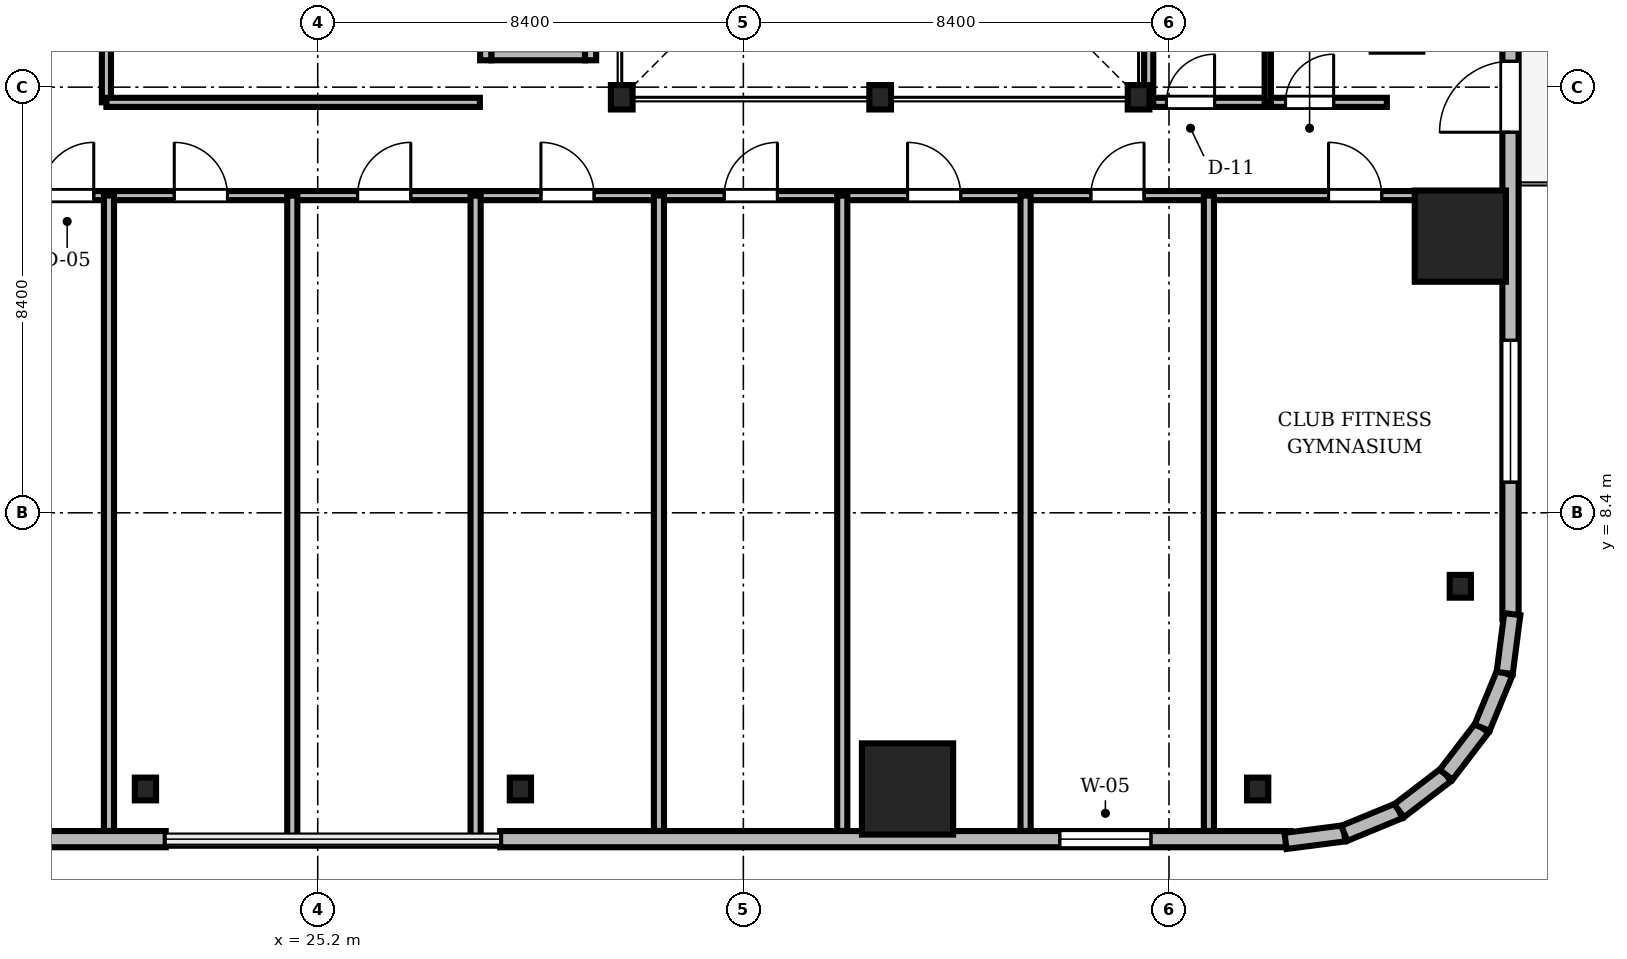
"""IFC4 building model, lengths in metres.
Left out: names, types, materials, properties, quantities, classifications, styles, units other than length and angle.
Written with IfcOpenShell. Run it as: python <this file> out.ifc"""

import sys

from ifc_helpers import new_model, si_unit, direction, frame, frame_2d, origin, origin_2d, place, context, subcontext, project, spatial, rectangle, i_section, extrude, source, transform, mapped, element, fill, save


model = new_model("IFC4")
c1 = context("Model", 3, precision=1e-05, world=origin(), true_north=direction((0.0, 1.0)))
c2 = subcontext(c1, "Body", "Model", "MODEL_VIEW")
j1 = project(units=[si_unit("LENGTHUNIT", "METRE"), si_unit("PLANEANGLEUNIT", "RADIAN")], contexts=[c1])
p1 = place(None, origin())
s1 = spatial("IfcSite", under=j1, at=p1, CompositionType="ELEMENT")
p2 = place(p1, origin())
s2 = spatial("IfcBuilding", under=s1, at=p2, CompositionType="ELEMENT")
p3 = place(p2, frame((0.0, 0.0, 64.1)))
s3 = spatial("IfcBuildingStorey", under=s2, at=p3, CompositionType="ELEMENT", Elevation=64.1)
m1 = source(origin(), c2, "Body", "SweptSolid", [
    extrude(i_section(OverallWidth=0.428, OverallDepth=0.481, WebThickness=0.04, FlangeThickness=0.063, FilletRadius=0.015, at=origin_2d()), origin(), (0.0, 0.0, 1.0), 3.41),
])
for number, where, z_axis, x_axis in (
    (1, (31.2, 16.6, 0.0), (0.0, 0.0, 1.0), (1.0, 0.0, 0.0)),
    (2, (36.3, 16.6, 0.0), (0.0, 0.0, 1.0), (1.0, 0.0, 0.0)),
    (3, (41.4, 16.6, 0.0), (0.0, 0.0, 1.0), (1.0, 0.0, 0.0)),
):
    element("IfcColumn", number, at=place(p3, frame(where, z_axis=z_axis, x_axis=x_axis)), inside=s3, PredefinedType="COLUMN", context=c2, shape_type="MappedRepresentation", body=[
        mapped(m1, transform((0.0, 0.0, 0.0), scale=1.0)),
    ])
m2 = source(origin(), c2, "Body", "SweptSolid", [
    extrude(rectangle(XDim=1.8, YDim=1.8, at=origin_2d()), origin(), (0.0, 0.0, 1.0), 3.41),
])
for number, where, z_axis, x_axis in (
    (4, (36.84, 2.95, 0.0), (0.0, 0.0, 1.0), (1.0, 0.0, 0.0)),
    (5, (47.75, 13.86, 0.0), (0.0, 0.0, 1.0), (1.0, 0.0, 0.0)),
):
    element("IfcColumn", number, at=place(p3, frame(where, z_axis=z_axis, x_axis=x_axis)), inside=s3, PredefinedType="COLUMN", context=c2, shape_type="MappedRepresentation", body=[
        mapped(m2, transform((0.0, 0.0, 0.0), scale=1.0)),
    ])
m3 = source(origin(), c2, "Body", "SweptSolid", [
    extrude(i_section(OverallWidth=0.419, OverallDepth=0.449, WebThickness=0.031, FlangeThickness=0.048, FilletRadius=0.015, at=origin_2d()), origin(), (0.0, 0.0, 1.0), 3.41),
])
for number, where, z_axis, x_axis in (
    (6, (21.8, 2.95, 0.0), (0.0, 0.0, 1.0), (1.0, 0.0, 0.0)),
    (7, (29.2, 2.95, 0.0), (0.0, 0.0, 1.0), (1.0, 0.0, 0.0)),
    (8, (43.75, 2.95, 0.0), (0.0, 0.0, 1.0), (1.0, 0.0, 0.0)),
    (9, (47.75, 6.95, 0.0), (0.0, 0.0, 1.0), (1.0, 0.0, 0.0)),
):
    element("IfcColumn", number, at=place(p3, frame(where, z_axis=z_axis, x_axis=x_axis)), inside=s3, PredefinedType="COLUMN", context=c2, shape_type="MappedRepresentation", body=[
        mapped(m3, transform((0.0, 0.0, 0.0), scale=1.0)),
    ])
m4 = source(origin(), c2, "Body", "SweptSolid", [
    extrude(rectangle(XDim=15.6, YDim=0.32, at=frame_2d((7.8, 0.0))), origin(), (0.0, 0.0, 1.0), 3.41),
])
p4 = place(p3, frame((6.6, 1.96, 0.0), z_axis=(0.0, 0.0, 1.0), x_axis=(1.0, 0.0, 0.0)))
e10 = element("IfcWall", 10, at=p4, inside=s3, PredefinedType="SOLIDWALL", context=c2, shape_type="MappedRepresentation", body=[
    mapped(m4, transform((0.0, 0.0, 0.0), scale=1.0)),
])
m5 = source(origin(), c2, "Body", "SweptSolid", [
    extrude(rectangle(XDim=1.4, YDim=2.3, at=frame_2d((0.7, 1.15))), frame((0.0, 0.17, 0.0), z_axis=(0.0, -1.0, 0.0), x_axis=(1.0, 0.0, 0.0)), (0.0, 0.0, 1.0), 0.34),
])
p5 = place(p4, frame((9.61, 0.0, 0.0)))
e11 = element("IfcOpeningElement", 11, at=p5, cuts=e10, PredefinedType="OPENING", context=c2, shape_type="MappedRepresentation", body=[
    mapped(m5, transform((0.0, 0.0, 0.0), scale=1.0)),
])
m6 = source(origin(), c2, "Body", "SweptSolid", [
    extrude(rectangle(XDim=2.8, YDim=2.4, at=frame_2d((1.4, 1.2))), frame((0.0, 0.17, 0.0), z_axis=(0.0, -1.0, 0.0), x_axis=(1.0, 0.0, 0.0)), (0.0, 0.0, 1.0), 0.34),
])
p6 = place(p4, frame((2.705, 0.0, 0.72)))
e12 = element("IfcOpeningElement", 12, at=p6, cuts=e10, PredefinedType="OPENING", context=c2, shape_type="MappedRepresentation", body=[
    mapped(m6, transform((0.0, 0.0, 0.0), scale=1.0)),
])
p7 = place(p3, frame((28.8, 1.96, 0.0), z_axis=(0.0, 0.0, 1.0), x_axis=(1.0, 0.0, 0.0)))
e13 = element("IfcWall", 13, at=p7, inside=s3, PredefinedType="SOLIDWALL", context=c2, shape_type="MappedRepresentation", body=[
    mapped(m4, transform((0.0, 0.0, 0.0), scale=1.0)),
])
m7 = source(origin(), c2, "Body", "SweptSolid", [
    extrude(rectangle(XDim=1.8, YDim=2.4, at=frame_2d((0.9, 1.2))), frame((0.0, 0.17, 0.0), z_axis=(0.0, -1.0, 0.0), x_axis=(1.0, 0.0, 0.0)), (0.0, 0.0, 1.0), 0.34),
])
p8 = place(p7, frame((11.045, 0.0, 0.72)))
e14 = element("IfcOpeningElement", 14, at=p8, cuts=e13, PredefinedType="OPENING", context=c2, shape_type="MappedRepresentation", body=[
    mapped(m7, transform((0.0, 0.0, 0.0), scale=1.0)),
])
p9 = place(p3, frame((48.74, 6.3, 0.0), z_axis=(0.0, 0.0, 1.0), x_axis=(0.0, 1.0, 0.0)))
e15 = element("IfcWall", 15, at=p9, inside=s3, PredefinedType="SOLIDWALL", context=c2, shape_type="MappedRepresentation", body=[
    mapped(m4, transform((0.0, 0.0, 0.0), scale=1.0)),
])
p10 = place(p9, frame((9.61, 0.0, 0.0)))
e16 = element("IfcOpeningElement", 16, at=p10, cuts=e15, PredefinedType="OPENING", context=c2, shape_type="MappedRepresentation", body=[
    mapped(m5, transform((0.0, 0.0, 0.0), scale=1.0)),
])
p11 = place(p9, frame((2.705, 0.0, 0.72)))
e17 = element("IfcOpeningElement", 17, at=p11, cuts=e15, PredefinedType="OPENING", context=c2, shape_type="MappedRepresentation", body=[
    mapped(m6, transform((0.0, 0.0, 0.0), scale=1.0)),
])
m8 = source(origin(), c2, "Body", "SweptSolid", [
    extrude(rectangle(XDim=1.17, YDim=0.32, at=frame_2d((0.585, 0.0))), origin(), (0.0, 0.0, 1.0), 3.41),
])
p12 = place(p3, frame((44.3, 1.925, 0.0), z_axis=(0.0, 0.0, 1.0), x_axis=(0.991762485493, 0.128090485085, 0.0)))
e18 = element("IfcWall", 18, at=p12, inside=s3, PredefinedType="SOLIDWALL", context=c2, shape_type="MappedRepresentation", body=[
    mapped(m8, transform((0.0, 0.0, 0.0), scale=1.0)),
])
m9 = source(origin(), c2, "Body", "SweptSolid", [
    extrude(rectangle(XDim=1.169, YDim=0.32, at=frame_2d((0.585, 0.0))), origin(), (0.0, 0.0, 1.0), 3.41),
])
p13 = place(p3, frame((45.46, 2.074, 0.0), z_axis=(0.0, 0.0, 1.0), x_axis=(0.924479075121, 0.381232789334, 0.0)))
e19 = element("IfcWall", 19, at=p13, inside=s3, PredefinedType="SOLIDWALL", context=c2, shape_type="MappedRepresentation", body=[
    mapped(m9, transform((0.0, 0.0, 0.0), scale=1.0)),
])
m10 = source(origin(), c2, "Body", "SweptSolid", [
    extrude(rectangle(XDim=1.169, YDim=0.32, at=frame_2d((0.584, 0.0))), origin(), (0.0, 0.0, 1.0), 3.41),
])
p14 = place(p3, frame((46.541, 2.52, 0.0), z_axis=(0.0, 0.0, 1.0), x_axis=(0.793663520347, 0.608356981114, 0.0)))
e20 = element("IfcWall", 20, at=p14, inside=s3, PredefinedType="SOLIDWALL", context=c2, shape_type="MappedRepresentation", body=[
    mapped(m10, transform((0.0, 0.0, 0.0), scale=1.0)),
])
m11 = source(origin(), c2, "Body", "SweptSolid", [
    extrude(rectangle(XDim=1.169, YDim=0.32, at=frame_2d((0.584, 0.0))), origin(), (0.0, 0.0, 1.0), 3.41),
])
for number, where, z_axis, x_axis in (
    (21, (47.469, 3.231, 0.0), (0.0, 0.0, 1.0), (0.608, 0.794, 0.0)),
    (22, (48.18, 4.159, 0.0), (0.0, 0.0, 1.0), (0.381, 0.925, 0.0)),
):
    element("IfcWall", number, at=place(p3, frame(where, z_axis=z_axis, x_axis=x_axis)), inside=s3, PredefinedType="SOLIDWALL", context=c2, shape_type="MappedRepresentation", body=[
        mapped(m11, transform((0.0, 0.0, 0.0), scale=1.0)),
    ])
m12 = source(origin(), c2, "Body", "SweptSolid", [
    extrude(rectangle(XDim=1.171, YDim=0.32, at=frame_2d((0.585, 0.0))), origin(), (0.0, 0.0, 1.0), 3.41),
])
p15 = place(p3, frame((48.625, 5.24, 0.0), z_axis=(0.0, 0.0, 1.0), x_axis=(0.128269133229, 0.991739395941, 0.0)))
e23 = element("IfcWall", 23, at=p15, inside=s3, PredefinedType="SOLIDWALL", context=c2, shape_type="MappedRepresentation", body=[
    mapped(m12, transform((0.0, 0.0, 0.0), scale=1.0)),
])
m13 = source(origin(), c2, "Body", "SweptSolid", [
    extrude(rectangle(XDim=1.85, YDim=0.22, at=frame_2d((0.925, 0.0))), origin(), (0.0, 0.0, 1.0), 3.41),
])
p16 = place(p3, frame((28.625, 17.44, 0.0), z_axis=(0.0, 0.0, 1.0), x_axis=(1.0, 0.0, 0.0)))
e24 = element("IfcWall", 24, at=p16, inside=s3, PredefinedType="SOLIDWALL", context=c2, shape_type="MappedRepresentation", body=[
    mapped(m13, transform((0.0, 0.0, 0.0), scale=1.0)),
])
m14 = source(origin(), c2, "Body", "SweptSolid", [
    extrude(rectangle(XDim=2.54, YDim=0.22, at=frame_2d((1.27, 0.0))), origin(), (0.0, 0.0, 1.0), 3.41),
])
for number, where, z_axis, x_axis in (
    (25, (28.515, 17.33, 0.0), (0.0, 0.0, 1.0), (0.0, 1.0, 0.0)),
    (26, (30.585, 17.33, 0.0), (0.0, 0.0, 1.0), (0.0, 1.0, 0.0)),
):
    element("IfcWall", number, at=place(p3, frame(where, z_axis=z_axis, x_axis=x_axis)), inside=s3, PredefinedType="SOLIDWALL", context=c2, shape_type="MappedRepresentation", body=[
        mapped(m14, transform((0.0, 0.0, 0.0), scale=1.0)),
    ])
m15 = source(origin(), c2, "Body", "SweptSolid", [
    extrude(rectangle(XDim=46.156, YDim=0.18, at=frame_2d((23.078, 0.0))), origin(), (0.0, 0.0, 1.0), 2.652),
])
p17 = place(p3, frame((2.422, 14.66, 0.0), z_axis=(0.0, 0.0, 1.0), x_axis=(1.0, 0.0, 0.0)))
e27 = element("IfcWall", 27, at=p17, inside=s3, PredefinedType="PARTITIONING", context=c2, shape_type="MappedRepresentation", body=[
    mapped(m15, transform((0.0, 0.0, 0.0), scale=1.0)),
])
m16 = source(origin(), c2, "Body", "SweptSolid", [
    extrude(rectangle(XDim=1.05, YDim=2.2, at=frame_2d((0.525, 1.1))), frame((0.0, 0.1, 0.0), z_axis=(0.0, -1.0, 0.0), x_axis=(1.0, 0.0, 0.0)), (0.0, 0.0, 1.0), 0.2),
])
p18 = place(p17, frame((17.308, 0.0, 0.0)))
e28 = element("IfcOpeningElement", 28, at=p18, cuts=e27, PredefinedType="OPENING", context=c2, shape_type="MappedRepresentation", body=[
    mapped(m16, transform((0.0, 0.0, 0.0), scale=1.0)),
])
p19 = place(p17, frame((19.947, 0.0, 0.0)))
e29 = element("IfcOpeningElement", 29, at=p19, cuts=e27, PredefinedType="OPENING", context=c2, shape_type="MappedRepresentation", body=[
    mapped(m16, transform((0.0, 0.0, 0.0), scale=1.0)),
])
p20 = place(p17, frame((23.565, 0.0, 0.0)))
e30 = element("IfcOpeningElement", 30, at=p20, cuts=e27, PredefinedType="OPENING", context=c2, shape_type="MappedRepresentation", body=[
    mapped(m16, transform((0.0, 0.0, 0.0), scale=1.0)),
])
p21 = place(p17, frame((27.183, 0.0, 0.0)))
e31 = element("IfcOpeningElement", 31, at=p21, cuts=e27, PredefinedType="OPENING", context=c2, shape_type="MappedRepresentation", body=[
    mapped(m16, transform((0.0, 0.0, 0.0), scale=1.0)),
])
p22 = place(p17, frame((30.801, 0.0, 0.0)))
e32 = element("IfcOpeningElement", 32, at=p22, cuts=e27, PredefinedType="OPENING", context=c2, shape_type="MappedRepresentation", body=[
    mapped(m16, transform((0.0, 0.0, 0.0), scale=1.0)),
])
p23 = place(p17, frame((34.419, 0.0, 0.0)))
e33 = element("IfcOpeningElement", 33, at=p23, cuts=e27, PredefinedType="OPENING", context=c2, shape_type="MappedRepresentation", body=[
    mapped(m16, transform((0.0, 0.0, 0.0), scale=1.0)),
])
p24 = place(p17, frame((38.037, 0.0, 0.0)))
e34 = element("IfcOpeningElement", 34, at=p24, cuts=e27, PredefinedType="OPENING", context=c2, shape_type="MappedRepresentation", body=[
    mapped(m16, transform((0.0, 0.0, 0.0), scale=1.0)),
])
p25 = place(p17, frame((42.727, 0.0, 0.0)))
e35 = element("IfcOpeningElement", 35, at=p25, cuts=e27, PredefinedType="OPENING", context=c2, shape_type="MappedRepresentation", body=[
    mapped(m16, transform((0.0, 0.0, 0.0), scale=1.0)),
])
m17 = source(origin(), c2, "Body", "SweptSolid", [
    extrude(rectangle(XDim=5.4, YDim=0.18, at=frame_2d((2.7, 0.0))), origin(), (0.0, 0.0, 1.0), 2.802),
])
p26 = place(p3, frame((21.03, 16.5, 0.0), z_axis=(0.0, 0.0, 1.0), x_axis=(0.0, 1.0, 0.0)))
e36 = element("IfcWall", 36, at=p26, inside=s3, PredefinedType="PARTITIONING", context=c2, shape_type="MappedRepresentation", body=[
    mapped(m17, transform((0.0, 0.0, 0.0), scale=1.0)),
])
p27 = place(p26, frame((2.0, 0.0, 0.0)))
e37 = element("IfcOpeningElement", 37, at=p27, cuts=e36, PredefinedType="OPENING", context=c2, shape_type="MappedRepresentation", body=[
    mapped(m16, transform((0.0, 0.0, 0.0), scale=1.0)),
])
m18 = source(origin(), c2, "Body", "SweptSolid", [
    extrude(rectangle(XDim=4.7, YDim=0.18, at=frame_2d((2.35, 0.0))), origin(), (0.0, 0.0, 1.0), 2.802),
])
p28 = place(p3, frame((41.6, 16.5, 0.0), z_axis=(0.0, 0.0, 1.0), x_axis=(1.0, 0.0, 0.0)))
e38 = element("IfcWall", 38, at=p28, inside=s3, PredefinedType="PARTITIONING", context=c2, shape_type="MappedRepresentation", body=[
    mapped(m18, transform((0.0, 0.0, 0.0), scale=1.0)),
])
m19 = source(origin(), c2, "Body", "SweptSolid", [
    extrude(rectangle(XDim=0.95, YDim=2.15, at=frame_2d((0.475, 1.075))), frame((0.0, 0.1, 0.0), z_axis=(0.0, -1.0, 0.0), x_axis=(1.0, 0.0, 0.0)), (0.0, 0.0, 1.0), 0.2),
])
p29 = place(p28, frame((0.35, 0.0, 0.0)))
e39 = element("IfcOpeningElement", 39, at=p29, cuts=e38, PredefinedType="OPENING", context=c2, shape_type="MappedRepresentation", body=[
    mapped(m19, transform((0.0, 0.0, 0.0), scale=1.0)),
])
p30 = place(p28, frame((2.7, 0.0, 0.0)))
e40 = element("IfcOpeningElement", 40, at=p30, cuts=e38, PredefinedType="OPENING", context=c2, shape_type="MappedRepresentation", body=[
    mapped(m19, transform((0.0, 0.0, 0.0), scale=1.0)),
])
m20 = source(origin(), c2, "Body", "SweptSolid", [
    extrude(rectangle(XDim=12.538, YDim=0.2, at=frame_2d((6.269, 0.0))), origin(), (0.0, 0.0, 1.0), 2.652),
])
p31 = place(p3, frame((21.08, 2.122, 0.0), z_axis=(0.0, 0.0, 1.0), x_axis=(0.0, 1.0, 0.0)))
e41 = element("IfcWall", 41, at=p31, inside=s3, PredefinedType="PARTITIONING", context=c2, shape_type="MappedRepresentation", body=[
    mapped(m20, transform((0.0, 0.0, 0.0), scale=1.0)),
])
m21 = source(origin(), c2, "Body", "SweptSolid", [
    extrude(rectangle(XDim=12.73, YDim=0.2, at=frame_2d((6.365, 0.0))), origin(), (0.0, 0.0, 1.0), 2.652),
])
for number, where, z_axis, x_axis in (
    (42, (24.698, 1.93, 0.0), (0.0, 0.0, 1.0), (0.0, 1.0, 0.0)),
    (43, (28.316, 1.93, 0.0), (0.0, 0.0, 1.0), (0.0, 1.0, 0.0)),
):
    element("IfcWall", number, at=place(p3, frame(where, z_axis=z_axis, x_axis=x_axis)), inside=s3, PredefinedType="PARTITIONING", context=c2, shape_type="MappedRepresentation", body=[
        mapped(m21, transform((0.0, 0.0, 0.0), scale=1.0)),
    ])
for number, where, z_axis, x_axis in (
    (44, (31.934, 2.122, 0.0), (0.0, 0.0, 1.0), (0.0, 1.0, 0.0)),
    (45, (35.552, 2.122, 0.0), (0.0, 0.0, 1.0), (0.0, 1.0, 0.0)),
    (46, (39.17, 2.122, 0.0), (0.0, 0.0, 1.0), (0.0, 1.0, 0.0)),
    (47, (42.788, 2.122, 0.0), (0.0, 0.0, 1.0), (0.0, 1.0, 0.0)),
):
    element("IfcWall", number, at=place(p3, frame(where, z_axis=z_axis, x_axis=x_axis)), inside=s3, PredefinedType="PARTITIONING", context=c2, shape_type="MappedRepresentation", body=[
        mapped(m20, transform((0.0, 0.0, 0.0), scale=1.0)),
    ])
m22 = source(origin(), c2, "Body", "SweptSolid", [
    extrude(rectangle(XDim=7.37, YDim=0.18, at=frame_2d((3.685, 0.0))), origin(), (0.0, 0.0, 1.0), 2.802),
])
p32 = place(p3, frame((21.03, 16.5, 0.0), z_axis=(0.0, 0.0, 1.0), x_axis=(1.0, 0.0, 0.0)))
e48 = element("IfcWall", 48, at=p32, inside=s3, PredefinedType="PARTITIONING", context=c2, shape_type="MappedRepresentation", body=[
    mapped(m22, transform((0.0, 0.0, 0.0), scale=1.0)),
])
m23 = source(origin(), c2, "Body", "SweptSolid", [
    extrude(rectangle(XDim=7.15, YDim=0.18, at=frame_2d((3.575, 0.0))), origin(), (0.0, 0.0, 1.0), 2.802),
])
p33 = place(p3, frame((41.6, 16.5, 0.0), z_axis=(0.0, 0.0, 1.0), x_axis=(0.0, 1.0, 0.0)))
e49 = element("IfcWall", 49, at=p33, inside=s3, PredefinedType="PARTITIONING", context=c2, shape_type="MappedRepresentation", body=[
    mapped(m23, transform((0.0, 0.0, 0.0), scale=1.0)),
])
m24 = source(origin(), c2, "Body", "SweptSolid", [
    extrude(rectangle(XDim=7.15, YDim=0.125, at=frame_2d((3.575, 0.0))), origin(), (0.0, 0.0, 1.0), 2.802),
])
p34 = place(p3, frame((43.95, 16.5, 0.0), z_axis=(0.0, 0.0, 1.0), x_axis=(0.0, 1.0, 0.0)))
e50 = element("IfcWall", 50, at=p34, inside=s3, PredefinedType="PARTITIONING", context=c2, shape_type="MappedRepresentation", body=[
    mapped(m24, transform((0.0, 0.0, 0.0), scale=1.0)),
])
m25 = source(origin(), c2, "Body", "SweptSolid", [
    extrude(rectangle(XDim=1.8, YDim=2.4, at=frame_2d((0.9, 1.2))), frame((0.0, 0.03, 0.0), z_axis=(0.0, -1.0, 0.0), x_axis=(1.0, 0.0, 0.0)), (0.0, 0.0, 1.0), 0.06),
])
p35 = place(p8, origin())
e51 = element("IfcWindow", 51, at=p35, inside=s3, PartitioningType="SINGLE_PANEL", PredefinedType="WINDOW", context=c2, shape_type="MappedRepresentation", body=[
    mapped(m25, transform((0.0, 0.0, 0.0), scale=1.0)),
])
fill(e14, e51)
m26 = source(origin(), c2, "Body", "SweptSolid", [
    extrude(rectangle(XDim=1.4, YDim=2.3, at=frame_2d((0.7, 1.15))), frame((0.0, 0.025, 0.0), z_axis=(0.0, -1.0, 0.0), x_axis=(1.0, 0.0, 0.0)), (0.0, 0.0, 1.0), 0.05),
])
p36 = place(p10, frame((1.4, 0.0, 0.0), z_axis=(0.0, 0.0, 1.0), x_axis=(-1.0, 0.0, 0.0)))
e52 = element("IfcDoor", 52, at=p36, inside=s3, OperationType="DOUBLE_DOOR_SLIDING", PredefinedType="DOOR", context=c2, shape_type="MappedRepresentation", body=[
    mapped(m26, transform((0.0, 0.0, 0.0), scale=1.0)),
])
fill(e16, e52)
m27 = source(origin(), c2, "Body", "SweptSolid", [
    extrude(rectangle(XDim=2.8, YDim=2.4, at=frame_2d((1.4, 1.2))), frame((0.0, 0.03, 0.0), z_axis=(0.0, -1.0, 0.0), x_axis=(1.0, 0.0, 0.0)), (0.0, 0.0, 1.0), 0.06),
])
p37 = place(p11, origin())
e53 = element("IfcWindow", 53, at=p37, inside=s3, PartitioningType="SINGLE_PANEL", PredefinedType="WINDOW", context=c2, shape_type="MappedRepresentation", body=[
    mapped(m27, transform((0.0, 0.0, 0.0), scale=1.0)),
])
fill(e17, e53)
m28 = source(origin(), c2, "Body", "SweptSolid", [
    extrude(rectangle(XDim=1.05, YDim=2.2, at=frame_2d((0.525, 1.1))), frame((0.0, 0.025, 0.0), z_axis=(0.0, -1.0, 0.0), x_axis=(1.0, 0.0, 0.0)), (0.0, 0.0, 1.0), 0.05),
])
p38 = place(p18, origin())
e54 = element("IfcDoor", 54, at=p38, inside=s3, OperationType="SINGLE_SWING_RIGHT", PredefinedType="DOOR", context=c2, shape_type="MappedRepresentation", body=[
    mapped(m28, transform((0.0, 0.0, 0.0), scale=1.0)),
])
fill(e28, e54)
p39 = place(p19, origin())
e55 = element("IfcDoor", 55, at=p39, inside=s3, OperationType="SINGLE_SWING_LEFT", PredefinedType="DOOR", context=c2, shape_type="MappedRepresentation", body=[
    mapped(m28, transform((0.0, 0.0, 0.0), scale=1.0)),
])
fill(e29, e55)
p40 = place(p20, origin())
e56 = element("IfcDoor", 56, at=p40, inside=s3, OperationType="SINGLE_SWING_RIGHT", PredefinedType="DOOR", context=c2, shape_type="MappedRepresentation", body=[
    mapped(m28, transform((0.0, 0.0, 0.0), scale=1.0)),
])
fill(e30, e56)
p41 = place(p21, origin())
e57 = element("IfcDoor", 57, at=p41, inside=s3, OperationType="SINGLE_SWING_LEFT", PredefinedType="DOOR", context=c2, shape_type="MappedRepresentation", body=[
    mapped(m28, transform((0.0, 0.0, 0.0), scale=1.0)),
])
fill(e31, e57)
p42 = place(p22, origin())
e58 = element("IfcDoor", 58, at=p42, inside=s3, OperationType="SINGLE_SWING_RIGHT", PredefinedType="DOOR", context=c2, shape_type="MappedRepresentation", body=[
    mapped(m28, transform((0.0, 0.0, 0.0), scale=1.0)),
])
fill(e32, e58)
p43 = place(p23, origin())
e59 = element("IfcDoor", 59, at=p43, inside=s3, OperationType="SINGLE_SWING_LEFT", PredefinedType="DOOR", context=c2, shape_type="MappedRepresentation", body=[
    mapped(m28, transform((0.0, 0.0, 0.0), scale=1.0)),
])
fill(e33, e59)
p44 = place(p24, origin())
e60 = element("IfcDoor", 60, at=p44, inside=s3, OperationType="SINGLE_SWING_RIGHT", PredefinedType="DOOR", context=c2, shape_type="MappedRepresentation", body=[
    mapped(m28, transform((0.0, 0.0, 0.0), scale=1.0)),
])
fill(e34, e60)
p45 = place(p25, origin())
e61 = element("IfcDoor", 61, at=p45, inside=s3, OperationType="SINGLE_SWING_LEFT", PredefinedType="DOOR", context=c2, shape_type="MappedRepresentation", body=[
    mapped(m28, transform((0.0, 0.0, 0.0), scale=1.0)),
])
fill(e35, e61)
m29 = source(origin(), c2, "Body", "SweptSolid", [
    extrude(rectangle(XDim=0.95, YDim=2.15, at=frame_2d((0.475, 1.075))), frame((0.0, 0.025, 0.0), z_axis=(0.0, -1.0, 0.0), x_axis=(1.0, 0.0, 0.0)), (0.0, 0.0, 1.0), 0.05),
])
p46 = place(p29, origin())
e62 = element("IfcDoor", 62, at=p46, inside=s3, OperationType="SINGLE_SWING_RIGHT", PredefinedType="DOOR", context=c2, shape_type="MappedRepresentation", body=[
    mapped(m29, transform((0.0, 0.0, 0.0), scale=1.0)),
])
fill(e39, e62)
p47 = place(p30, origin())
e63 = element("IfcDoor", 63, at=p47, inside=s3, OperationType="SINGLE_SWING_RIGHT", PredefinedType="DOOR", context=c2, shape_type="MappedRepresentation", body=[
    mapped(m29, transform((0.0, 0.0, 0.0), scale=1.0)),
])
fill(e40, e63)
save(model, sys.argv[1])
